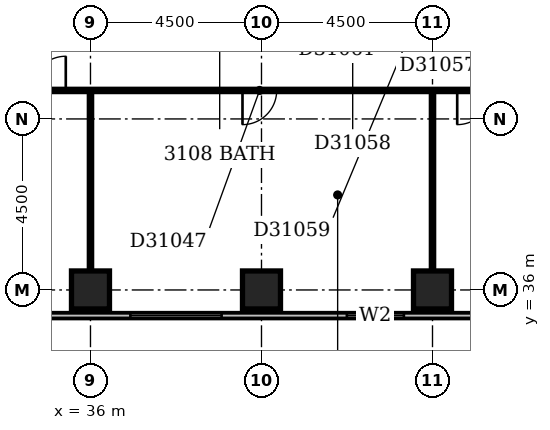
"""IFC4 building model, lengths in metres.
Left out: names, types, materials, properties, quantities, classifications, styles, units other than length and angle.
Written with IfcOpenShell. Run it as: python <this file> out.ifc"""

import sys

from ifc_helpers import new_model, si_unit, direction, frame, frame_2d, origin, origin_2d, place, context, subcontext, project, spatial, rectangle, extrude, element, fill, save


model = new_model("IFC4")
c1 = context("Model", 3, precision=1e-05, world=origin(), true_north=direction((0.0, 1.0)))
c2 = subcontext(c1, "Body", "Model", "MODEL_VIEW")
j1 = project(units=[si_unit("LENGTHUNIT", "METRE"), si_unit("PLANEANGLEUNIT", "RADIAN")], contexts=[c1])
p1 = place(None, origin())
s1 = spatial("IfcSite", under=j1, at=p1, CompositionType="ELEMENT")
p2 = place(p1, origin())
s2 = spatial("IfcBuilding", under=s1, at=p2, CompositionType="ELEMENT")
p3 = place(p2, frame((0.0, 0.0, 126.8)))
s3 = spatial("IfcBuildingStorey", under=s2, at=p3, CompositionType="ELEMENT", Elevation=126.8)
for number, where, z_axis, x_axis in (
    (1, (36.0, 36.0, -0.3), (0.0, 0.0, 1.0), (1.0, 0.0, 0.0)),
    (2, (40.5, 36.0, -0.3), (0.0, 0.0, 1.0), (1.0, 0.0, 0.0)),
    (3, (45.0, 36.0, -0.3), (0.0, 0.0, 1.0), (1.0, 0.0, 0.0)),
):
    element("IfcColumn", number, at=place(p3, frame(where, z_axis=z_axis, x_axis=x_axis)), inside=s3, PredefinedType="COLUMN", context=c2, shape_type="SweptSolid", body=[
        extrude(rectangle(XDim=1.0, YDim=1.0, at=origin_2d()), origin(), (0.0, 0.0, 1.0), 3.6),
    ])
p4 = place(p3, frame((23.1, 35.325, 0.0), z_axis=(0.0, 0.0, 1.0), x_axis=(1.0, 0.0, 0.0)))
e4 = element("IfcWall", 4, at=p4, inside=s3, PredefinedType="STANDARD", context=c2, shape_type="SweptSolid", body=[
    extrude(rectangle(XDim=45.15, YDim=0.15, at=frame_2d((22.575, 0.0))), origin(), (0.0, 0.0, 1.0), 2.7),
])
p5 = place(p4, frame((0.45, 0.0, 0.6)))
e5 = element("IfcOpeningElement", 5, at=p5, cuts=e4, PredefinedType="OPENING", context=c2, shape_type="SweptSolid", body=[
    extrude(rectangle(XDim=2.4, YDim=1.8, at=frame_2d((1.2, 0.9))), frame((0.0, 0.087, 0.0), z_axis=(0.0, -1.0, 0.0), x_axis=(1.0, 0.0, 0.0)), (0.0, 0.0, 1.0), 0.174),
])
p6 = place(p4, frame((4.743, 0.0, 0.6)))
e6 = element("IfcOpeningElement", 6, at=p6, cuts=e4, PredefinedType="OPENING", context=c2, shape_type="SweptSolid", body=[
    extrude(rectangle(XDim=1.8, YDim=1.8, at=frame_2d((0.9, 0.9))), frame((0.0, 0.087, 0.0), z_axis=(0.0, -1.0, 0.0), x_axis=(1.0, 0.0, 0.0)), (0.0, 0.0, 1.0), 0.174),
])
p7 = place(p4, frame((9.45, 0.0, 0.6)))
e7 = element("IfcOpeningElement", 7, at=p7, cuts=e4, PredefinedType="OPENING", context=c2, shape_type="SweptSolid", body=[
    extrude(rectangle(XDim=2.4, YDim=1.8, at=frame_2d((1.2, 0.9))), frame((0.0, 0.087, 0.0), z_axis=(0.0, -1.0, 0.0), x_axis=(1.0, 0.0, 0.0)), (0.0, 0.0, 1.0), 0.174),
])
p8 = place(p4, frame((13.95, 0.0, 0.6)))
e8 = element("IfcOpeningElement", 8, at=p8, cuts=e4, PredefinedType="OPENING", context=c2, shape_type="SweptSolid", body=[
    extrude(rectangle(XDim=2.4, YDim=1.8, at=frame_2d((1.2, 0.9))), frame((0.0, 0.087, 0.0), z_axis=(0.0, -1.0, 0.0), x_axis=(1.0, 0.0, 0.0)), (0.0, 0.0, 1.0), 0.174),
])
p9 = place(p4, frame((19.646, 0.0, 0.6)))
e9 = element("IfcOpeningElement", 9, at=p9, cuts=e4, PredefinedType="OPENING", context=c2, shape_type="SweptSolid", body=[
    extrude(rectangle(XDim=1.5, YDim=1.8, at=frame_2d((0.75, 0.9))), frame((0.0, 0.087, 0.0), z_axis=(0.0, -1.0, 0.0), x_axis=(1.0, 0.0, 0.0)), (0.0, 0.0, 1.0), 0.174),
])
p10 = place(p4, frame((22.95, 0.0, 0.6)))
e10 = element("IfcOpeningElement", 10, at=p10, cuts=e4, PredefinedType="OPENING", context=c2, shape_type="SweptSolid", body=[
    extrude(rectangle(XDim=2.4, YDim=1.8, at=frame_2d((1.2, 0.9))), frame((0.0, 0.087, 0.0), z_axis=(0.0, -1.0, 0.0), x_axis=(1.0, 0.0, 0.0)), (0.0, 0.0, 1.0), 0.174),
])
p11 = place(p4, frame((27.45, 0.0, 0.6)))
e11 = element("IfcOpeningElement", 11, at=p11, cuts=e4, PredefinedType="OPENING", context=c2, shape_type="SweptSolid", body=[
    extrude(rectangle(XDim=2.4, YDim=1.8, at=frame_2d((1.2, 0.9))), frame((0.0, 0.087, 0.0), z_axis=(0.0, -1.0, 0.0), x_axis=(1.0, 0.0, 0.0)), (0.0, 0.0, 1.0), 0.174),
])
p12 = place(p4, frame((31.95, 0.0, 0.6)))
e12 = element("IfcOpeningElement", 12, at=p12, cuts=e4, PredefinedType="OPENING", context=c2, shape_type="SweptSolid", body=[
    extrude(rectangle(XDim=2.4, YDim=1.8, at=frame_2d((1.2, 0.9))), frame((0.0, 0.087, 0.0), z_axis=(0.0, -1.0, 0.0), x_axis=(1.0, 0.0, 0.0)), (0.0, 0.0, 1.0), 0.174),
])
p13 = place(p4, frame((37.911, 0.0, 0.6)))
e13 = element("IfcOpeningElement", 13, at=p13, cuts=e4, PredefinedType="OPENING", context=c2, shape_type="SweptSolid", body=[
    extrude(rectangle(XDim=1.2, YDim=1.8, at=frame_2d((0.6, 0.9))), frame((0.0, 0.087, 0.0), z_axis=(0.0, -1.0, 0.0), x_axis=(1.0, 0.0, 0.0)), (0.0, 0.0, 1.0), 0.174),
])
p14 = place(p4, frame((40.95, 0.0, 0.6)))
e14 = element("IfcOpeningElement", 14, at=p14, cuts=e4, PredefinedType="OPENING", context=c2, shape_type="SweptSolid", body=[
    extrude(rectangle(XDim=2.4, YDim=1.8, at=frame_2d((1.2, 0.9))), frame((0.0, 0.087, 0.0), z_axis=(0.0, -1.0, 0.0), x_axis=(1.0, 0.0, 0.0)), (0.0, 0.0, 1.0), 0.174),
])
p15 = place(p3, frame((36.0, 36.5, 0.0), z_axis=(0.0, 0.0, 1.0), x_axis=(0.0, 1.0, 0.0)))
e15 = element("IfcWall", 15, at=p15, inside=s3, PredefinedType="PARTITIONING", context=c2, shape_type="SweptSolid", body=[
    extrude(rectangle(XDim=4.7, YDim=0.1, at=frame_2d((2.35, 0.0))), origin(), (0.0, 0.0, 1.0), 2.4),
])
p16 = place(p3, frame((45.0, 36.5, 0.0), z_axis=(0.0, 0.0, 1.0), x_axis=(0.0, 1.0, 0.0)))
e16 = element("IfcWall", 16, at=p16, inside=s3, PredefinedType="PARTITIONING", context=c2, shape_type="SweptSolid", body=[
    extrude(rectangle(XDim=4.7, YDim=0.1, at=frame_2d((2.35, 0.0))), origin(), (0.0, 0.0, 1.0), 2.6),
])
p17 = place(p3, frame((31.6, 41.25, 0.0), z_axis=(0.0, 0.0, 1.0), x_axis=(1.0, 0.0, 0.0)))
e17 = element("IfcWall", 17, at=p17, inside=s3, PredefinedType="PARTITIONING", context=c2, shape_type="SweptSolid", body=[
    extrude(rectangle(XDim=17.8, YDim=0.1, at=frame_2d((8.9, 0.0))), origin(), (0.0, 0.0, 1.0), 3.3),
])
p18 = place(p17, frame((2.85, 0.0, 0.0)))
e18 = element("IfcOpeningElement", 18, at=p18, cuts=e17, PredefinedType="OPENING", context=c2, shape_type="SweptSolid", body=[
    extrude(rectangle(XDim=0.9, YDim=2.1, at=frame_2d((0.45, 1.05))), frame((0.0, 0.062, 0.0), z_axis=(0.0, -1.0, 0.0), x_axis=(1.0, 0.0, 0.0)), (0.0, 0.0, 1.0), 0.124),
])
p19 = place(p17, frame((8.4, 0.0, 0.0)))
e19 = element("IfcOpeningElement", 19, at=p19, cuts=e17, PredefinedType="OPENING", context=c2, shape_type="SweptSolid", body=[
    extrude(rectangle(XDim=0.9, YDim=2.1, at=frame_2d((0.45, 1.05))), frame((0.0, 0.062, 0.0), z_axis=(0.0, -1.0, 0.0), x_axis=(1.0, 0.0, 0.0)), (0.0, 0.0, 1.0), 0.124),
])
p20 = place(p17, frame((14.05, 0.0, 0.0)))
e20 = element("IfcOpeningElement", 20, at=p20, cuts=e17, PredefinedType="OPENING", context=c2, shape_type="SweptSolid", body=[
    extrude(rectangle(XDim=0.9, YDim=2.1, at=frame_2d((0.45, 1.05))), frame((0.0, 0.062, 0.0), z_axis=(0.0, -1.0, 0.0), x_axis=(1.0, 0.0, 0.0)), (0.0, 0.0, 1.0), 0.124),
])
p21 = place(p8, origin())
e21 = element("IfcWindow", 21, at=p21, inside=s3, PartitioningType="SINGLE_PANEL", PredefinedType="WINDOW", context=c2, shape_type="SweptSolid", body=[
    extrude(rectangle(XDim=2.4, YDim=1.8, at=frame_2d((1.2, 0.9))), frame((0.0, 0.03, 0.0), z_axis=(0.0, -1.0, 0.0), x_axis=(1.0, 0.0, 0.0)), (0.0, 0.0, 1.0), 0.06),
])
fill(e8, e21)
p22 = place(p9, origin())
e22 = element("IfcWindow", 22, at=p22, inside=s3, PartitioningType="SINGLE_PANEL", PredefinedType="WINDOW", context=c2, shape_type="SweptSolid", body=[
    extrude(rectangle(XDim=1.5, YDim=1.8, at=frame_2d((0.75, 0.9))), frame((0.0, 0.03, 0.0), z_axis=(0.0, -1.0, 0.0), x_axis=(1.0, 0.0, 0.0)), (0.0, 0.0, 1.0), 0.06),
])
fill(e9, e22)
p23 = place(p18, frame((0.9, 0.0, 0.0), z_axis=(0.0, 0.0, 1.0), x_axis=(-1.0, 0.0, 0.0)))
e23 = element("IfcDoor", 23, at=p23, inside=s3, OperationType="SINGLE_SWING_LEFT", PredefinedType="DOOR", context=c2, shape_type="SweptSolid", body=[
    extrude(rectangle(XDim=0.9, YDim=2.1, at=frame_2d((0.45, 1.05))), frame((0.0, 0.025, 0.0), z_axis=(0.0, -1.0, 0.0), x_axis=(1.0, 0.0, 0.0)), (0.0, 0.0, 1.0), 0.05),
])
fill(e18, e23)
p24 = place(p19, frame((0.9, 0.0, 0.0), z_axis=(0.0, 0.0, 1.0), x_axis=(-1.0, 0.0, 0.0)))
e24 = element("IfcDoor", 24, at=p24, inside=s3, OperationType="SINGLE_SWING_RIGHT", PredefinedType="DOOR", context=c2, shape_type="SweptSolid", body=[
    extrude(rectangle(XDim=0.9, YDim=2.1, at=frame_2d((0.45, 1.05))), frame((0.0, 0.025, 0.0), z_axis=(0.0, -1.0, 0.0), x_axis=(1.0, 0.0, 0.0)), (0.0, 0.0, 1.0), 0.05),
])
fill(e19, e24)
p25 = place(p20, frame((0.9, 0.0, 0.0), z_axis=(0.0, 0.0, 1.0), x_axis=(-1.0, 0.0, 0.0)))
e25 = element("IfcDoor", 25, at=p25, inside=s3, OperationType="SINGLE_SWING_RIGHT", PredefinedType="DOOR", context=c2, shape_type="SweptSolid", body=[
    extrude(rectangle(XDim=0.9, YDim=2.1, at=frame_2d((0.45, 1.05))), frame((0.0, 0.025, 0.0), z_axis=(0.0, -1.0, 0.0), x_axis=(1.0, 0.0, 0.0)), (0.0, 0.0, 1.0), 0.05),
])
fill(e20, e25)
save(model, sys.argv[1])
